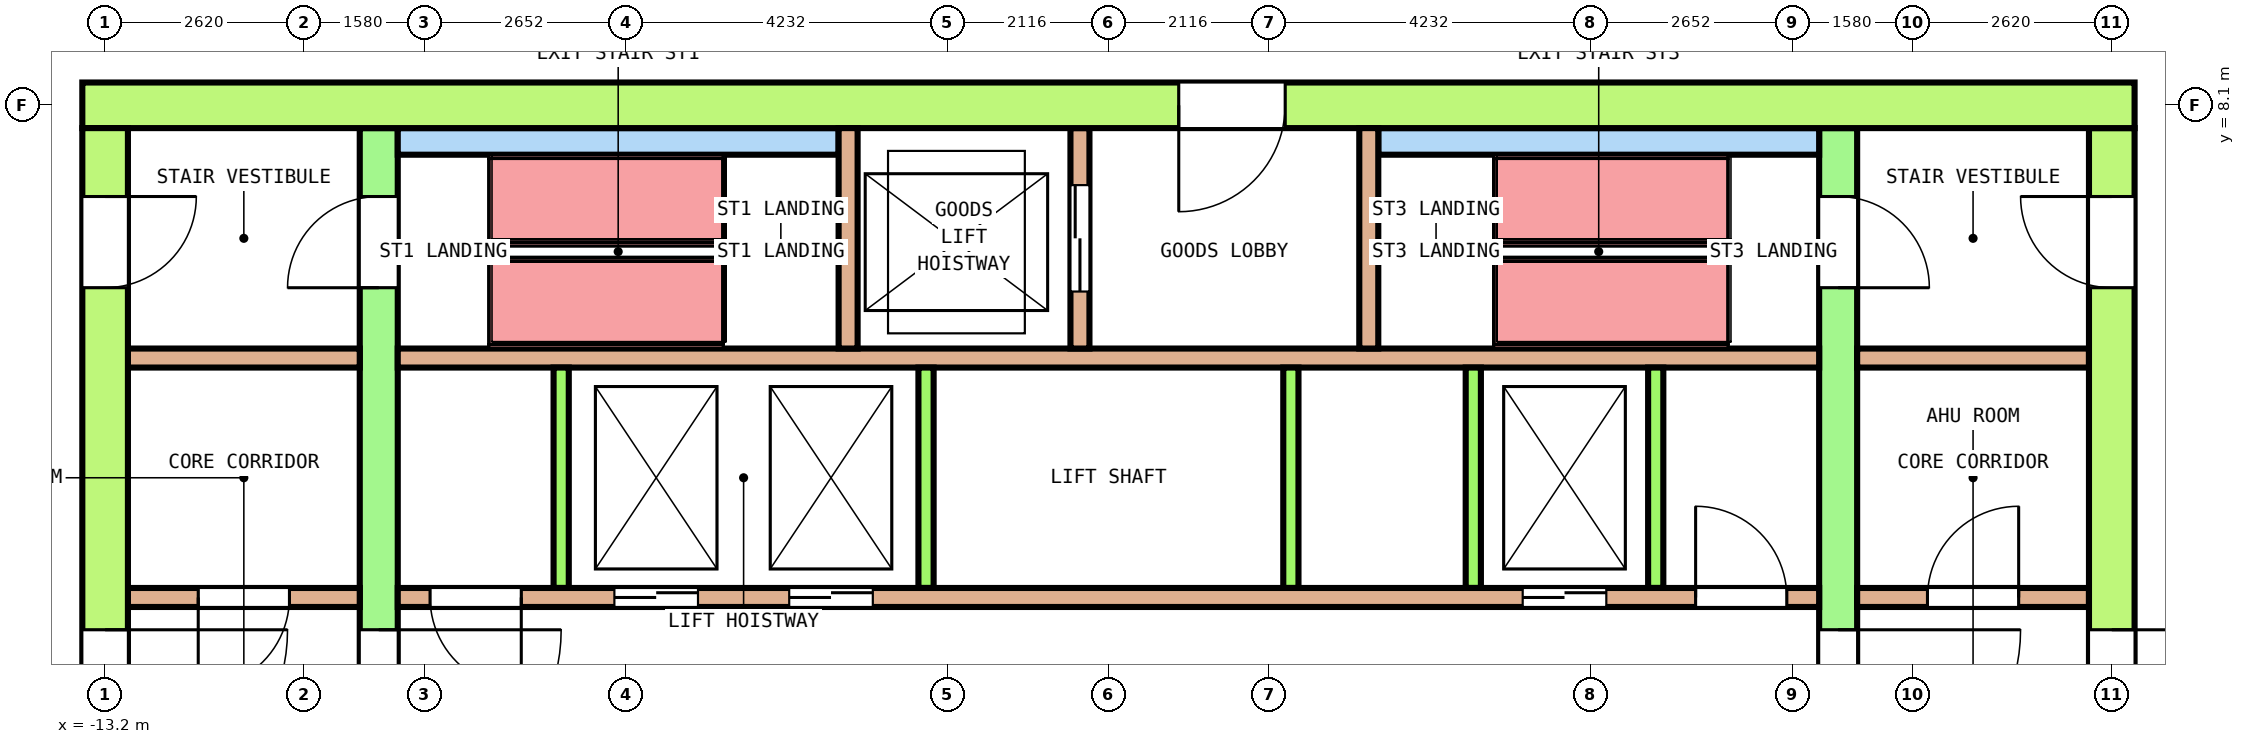
"""IFC4 building model, lengths in metres.
Left out: names, types, materials, properties, quantities, classifications, styles, units other than length and angle.
Written with IfcOpenShell. Run it as: python <this file> out.ifc"""

import sys

from ifc_helpers import new_model, si_unit, direction, frame, frame_2d, origin, place, context, subcontext, project, spatial, rectangle, extrude, element, fill, save


model = new_model("IFC4")
c1 = context("Model", 3, precision=1e-05, world=origin(), true_north=direction((0.0, 1.0)))
c2 = subcontext(c1, "Body", "Model", "MODEL_VIEW")
j1 = project(units=[si_unit("LENGTHUNIT", "METRE"), si_unit("PLANEANGLEUNIT", "RADIAN")], contexts=[c1])
p1 = place(None, origin())
s1 = spatial("IfcSite", under=j1, at=p1, CompositionType="ELEMENT")
p2 = place(p1, origin())
s2 = spatial("IfcBuilding", under=s1, at=p2, CompositionType="ELEMENT")
p3 = place(p2, frame((0.0, 0.0, 202.4)))
s3 = spatial("IfcBuildingStorey", under=s2, at=p3, CompositionType="ELEMENT", Elevation=202.4)
p4 = place(p3, frame((-13.5, 8.1, 0.0), z_axis=(0.0, 0.0, 1.0), x_axis=(1.0, 0.0, 0.0)))
e1 = element("IfcWall", 1, at=p4, inside=s3, PredefinedType="SHEAR", context=c2, shape_type="SweptSolid", body=[
    extrude(rectangle(XDim=27.0, YDim=0.6, at=frame_2d((13.5, 0.0))), origin(), (0.0, 0.0, 1.0), 8.7),
])
p5 = place(p4, frame((14.425, 0.0, 0.0)))
e2 = element("IfcOpeningElement", 2, at=p5, cuts=e1, PredefinedType="OPENING", context=c2, shape_type="SweptSolid", body=[
    extrude(rectangle(XDim=1.4, YDim=2.1, at=frame_2d((0.7, 1.05))), frame((0.0, 0.31, 0.0), z_axis=(0.0, -1.0, 0.0), x_axis=(1.0, 0.0, 0.0)), (0.0, 0.0, 1.0), 0.62),
])
p6 = place(p3, frame((-13.2, -7.8, 0.0), z_axis=(0.0, 0.0, 1.0), x_axis=(0.0, 1.0, 0.0)))
e3 = element("IfcWall", 3, at=p6, inside=s3, PredefinedType="SHEAR", context=c2, shape_type="SweptSolid", body=[
    extrude(rectangle(XDim=15.6, YDim=0.6, at=frame_2d((7.8, 0.0))), origin(), (0.0, 0.0, 1.0), 8.7),
])
p7 = place(p6, frame((6.6, 0.0, 0.0)))
e4 = element("IfcOpeningElement", 4, at=p7, cuts=e3, PredefinedType="OPENING", context=c2, shape_type="SweptSolid", body=[
    extrude(rectangle(XDim=2.4, YDim=2.1, at=frame_2d((1.2, 1.05))), frame((0.0, 0.31, 0.0), z_axis=(0.0, -1.0, 0.0), x_axis=(1.0, 0.0, 0.0)), (0.0, 0.0, 1.0), 0.62),
])
p8 = place(p6, frame((13.5, 0.0, 0.0)))
e5 = element("IfcOpeningElement", 5, at=p8, cuts=e3, PredefinedType="OPENING", context=c2, shape_type="SweptSolid", body=[
    extrude(rectangle(XDim=1.2, YDim=2.1, at=frame_2d((0.6, 1.05))), frame((0.0, 0.31, 0.0), z_axis=(0.0, -1.0, 0.0), x_axis=(1.0, 0.0, 0.0)), (0.0, 0.0, 1.0), 0.62),
])
p9 = place(p6, frame((0.9, 0.0, 0.0)))
e6 = element("IfcOpeningElement", 6, at=p9, cuts=e3, PredefinedType="OPENING", context=c2, shape_type="SweptSolid", body=[
    extrude(rectangle(XDim=1.2, YDim=2.1, at=frame_2d((0.6, 1.05))), frame((0.0, 0.31, 0.0), z_axis=(0.0, -1.0, 0.0), x_axis=(1.0, 0.0, 0.0)), (0.0, 0.0, 1.0), 0.62),
])
p10 = place(p3, frame((13.2, -7.8, 0.0), z_axis=(0.0, 0.0, 1.0), x_axis=(0.0, 1.0, 0.0)))
e7 = element("IfcWall", 7, at=p10, inside=s3, PredefinedType="SHEAR", context=c2, shape_type="SweptSolid", body=[
    extrude(rectangle(XDim=15.6, YDim=0.6, at=frame_2d((7.8, 0.0))), origin(), (0.0, 0.0, 1.0), 8.7),
])
p11 = place(p10, frame((6.6, 0.0, 0.0)))
e8 = element("IfcOpeningElement", 8, at=p11, cuts=e7, PredefinedType="OPENING", context=c2, shape_type="SweptSolid", body=[
    extrude(rectangle(XDim=2.4, YDim=2.1, at=frame_2d((1.2, 1.05))), frame((0.0, 0.31, 0.0), z_axis=(0.0, -1.0, 0.0), x_axis=(1.0, 0.0, 0.0)), (0.0, 0.0, 1.0), 0.62),
])
p12 = place(p10, frame((13.5, 0.0, 0.0)))
e9 = element("IfcOpeningElement", 9, at=p12, cuts=e7, PredefinedType="OPENING", context=c2, shape_type="SweptSolid", body=[
    extrude(rectangle(XDim=1.2, YDim=2.1, at=frame_2d((0.6, 1.05))), frame((0.0, 0.31, 0.0), z_axis=(0.0, -1.0, 0.0), x_axis=(1.0, 0.0, 0.0)), (0.0, 0.0, 1.0), 0.62),
])
p13 = place(p10, frame((1.0, 0.0, 0.0)))
e10 = element("IfcOpeningElement", 10, at=p13, cuts=e7, PredefinedType="OPENING", context=c2, shape_type="SweptSolid", body=[
    extrude(rectangle(XDim=1.0, YDim=2.1, at=frame_2d((0.5, 1.05))), frame((0.0, 0.31, 0.0), z_axis=(0.0, -1.0, 0.0), x_axis=(1.0, 0.0, 0.0)), (0.0, 0.0, 1.0), 0.62),
])
p14 = place(p3, frame((-9.6, -7.8, 0.0), z_axis=(0.0, 0.0, 1.0), x_axis=(0.0, 1.0, 0.0)))
e11 = element("IfcWall", 11, at=p14, inside=s3, PredefinedType="SHEAR", context=c2, shape_type="SweptSolid", body=[
    extrude(rectangle(XDim=15.6, YDim=0.5, at=frame_2d((7.8, 0.0))), origin(), (0.0, 0.0, 1.0), 8.7),
])
p15 = place(p14, frame((6.6, 0.0, 0.0)))
e12 = element("IfcOpeningElement", 12, at=p15, cuts=e11, PredefinedType="OPENING", context=c2, shape_type="SweptSolid", body=[
    extrude(rectangle(XDim=2.4, YDim=2.1, at=frame_2d((1.2, 1.05))), frame((0.0, 0.26, 0.0), z_axis=(0.0, -1.0, 0.0), x_axis=(1.0, 0.0, 0.0)), (0.0, 0.0, 1.0), 0.52),
])
p16 = place(p14, frame((13.5, 0.0, 0.0)))
e13 = element("IfcOpeningElement", 13, at=p16, cuts=e11, PredefinedType="OPENING", context=c2, shape_type="SweptSolid", body=[
    extrude(rectangle(XDim=1.2, YDim=2.1, at=frame_2d((0.6, 1.05))), frame((0.0, 0.26, 0.0), z_axis=(0.0, -1.0, 0.0), x_axis=(1.0, 0.0, 0.0)), (0.0, 0.0, 1.0), 0.52),
])
p17 = place(p14, frame((0.9, 0.0, 0.0)))
e14 = element("IfcOpeningElement", 14, at=p17, cuts=e11, PredefinedType="OPENING", context=c2, shape_type="SweptSolid", body=[
    extrude(rectangle(XDim=1.2, YDim=2.1, at=frame_2d((0.6, 1.05))), frame((0.0, 0.26, 0.0), z_axis=(0.0, -1.0, 0.0), x_axis=(1.0, 0.0, 0.0)), (0.0, 0.0, 1.0), 0.52),
])
p18 = place(p3, frame((9.6, -7.8, 0.0), z_axis=(0.0, 0.0, 1.0), x_axis=(0.0, 1.0, 0.0)))
e15 = element("IfcWall", 15, at=p18, inside=s3, PredefinedType="SHEAR", context=c2, shape_type="SweptSolid", body=[
    extrude(rectangle(XDim=15.6, YDim=0.5, at=frame_2d((7.8, 0.0))), origin(), (0.0, 0.0, 1.0), 8.7),
])
p19 = place(p18, frame((6.6, 0.0, 0.0)))
e16 = element("IfcOpeningElement", 16, at=p19, cuts=e15, PredefinedType="OPENING", context=c2, shape_type="SweptSolid", body=[
    extrude(rectangle(XDim=2.4, YDim=2.1, at=frame_2d((1.2, 1.05))), frame((0.0, 0.26, 0.0), z_axis=(0.0, -1.0, 0.0), x_axis=(1.0, 0.0, 0.0)), (0.0, 0.0, 1.0), 0.52),
])
p20 = place(p18, frame((13.5, 0.0, 0.0)))
e17 = element("IfcOpeningElement", 17, at=p20, cuts=e15, PredefinedType="OPENING", context=c2, shape_type="SweptSolid", body=[
    extrude(rectangle(XDim=1.2, YDim=2.1, at=frame_2d((0.6, 1.05))), frame((0.0, 0.26, 0.0), z_axis=(0.0, -1.0, 0.0), x_axis=(1.0, 0.0, 0.0)), (0.0, 0.0, 1.0), 0.52),
])
p21 = place(p18, frame((1.0, 0.0, 0.0)))
e18 = element("IfcOpeningElement", 18, at=p21, cuts=e15, PredefinedType="OPENING", context=c2, shape_type="SweptSolid", body=[
    extrude(rectangle(XDim=1.0, YDim=2.1, at=frame_2d((0.5, 1.05))), frame((0.0, 0.26, 0.0), z_axis=(0.0, -1.0, 0.0), x_axis=(1.0, 0.0, 0.0)), (0.0, 0.0, 1.0), 0.52),
])
p22 = place(p3, frame((-12.9, 1.625, 0.0), z_axis=(0.0, 0.0, 1.0), x_axis=(1.0, 0.0, 0.0)))
e19 = element("IfcWall", 19, at=p22, inside=s3, PredefinedType="SOLIDWALL", context=c2, shape_type="SweptSolid", body=[
    extrude(rectangle(XDim=3.05, YDim=0.25, at=frame_2d((1.525, 0.0))), origin(), (0.0, 0.0, 1.0), 8.7),
])
p23 = place(p22, frame((0.925, 0.0, 0.0)))
e20 = element("IfcOpeningElement", 20, at=p23, cuts=e19, PredefinedType="OPENING", context=c2, shape_type="SweptSolid", body=[
    extrude(rectangle(XDim=1.2, YDim=2.1, at=frame_2d((0.6, 1.05))), frame((0.0, 0.135, 0.0), z_axis=(0.0, -1.0, 0.0), x_axis=(1.0, 0.0, 0.0)), (0.0, 0.0, 1.0), 0.27),
])
p24 = place(p3, frame((-9.35, 1.625, 0.0), z_axis=(0.0, 0.0, 1.0), x_axis=(1.0, 0.0, 0.0)))
e21 = element("IfcWall", 21, at=p24, inside=s3, PredefinedType="SOLIDWALL", context=c2, shape_type="SweptSolid", body=[
    extrude(rectangle(XDim=18.7, YDim=0.25, at=frame_2d((9.35, 0.0))), origin(), (0.0, 0.0, 1.0), 8.7),
])
p25 = place(p24, frame((2.85, 0.0, 0.0)))
e22 = element("IfcOpeningElement", 22, at=p25, cuts=e21, PredefinedType="OPENING", context=c2, shape_type="SweptSolid", body=[
    extrude(rectangle(XDim=1.1, YDim=2.1, at=frame_2d((0.55, 1.05))), frame((0.0, 0.135, 0.0), z_axis=(0.0, -1.0, 0.0), x_axis=(1.0, 0.0, 0.0)), (0.0, 0.0, 1.0), 0.27),
])
p26 = place(p24, frame((5.15, 0.0, 0.0)))
e23 = element("IfcOpeningElement", 23, at=p26, cuts=e21, PredefinedType="OPENING", context=c2, shape_type="SweptSolid", body=[
    extrude(rectangle(XDim=1.1, YDim=2.1, at=frame_2d((0.55, 1.05))), frame((0.0, 0.135, 0.0), z_axis=(0.0, -1.0, 0.0), x_axis=(1.0, 0.0, 0.0)), (0.0, 0.0, 1.0), 0.27),
])
p27 = place(p24, frame((14.8, 0.0, 0.0)))
e24 = element("IfcOpeningElement", 24, at=p27, cuts=e21, PredefinedType="OPENING", context=c2, shape_type="SweptSolid", body=[
    extrude(rectangle(XDim=1.1, YDim=2.1, at=frame_2d((0.55, 1.05))), frame((0.0, 0.135, 0.0), z_axis=(0.0, -1.0, 0.0), x_axis=(1.0, 0.0, 0.0)), (0.0, 0.0, 1.0), 0.27),
])
p28 = place(p24, frame((0.425, 0.0, 0.0)))
e25 = element("IfcOpeningElement", 25, at=p28, cuts=e21, PredefinedType="OPENING", context=c2, shape_type="SweptSolid", body=[
    extrude(rectangle(XDim=1.2, YDim=2.1, at=frame_2d((0.6, 1.05))), frame((0.0, 0.135, 0.0), z_axis=(0.0, -1.0, 0.0), x_axis=(1.0, 0.0, 0.0)), (0.0, 0.0, 1.0), 0.27),
])
p29 = place(p24, frame((17.075, 0.0, 0.0)))
e26 = element("IfcOpeningElement", 26, at=p29, cuts=e21, PredefinedType="OPENING", context=c2, shape_type="SweptSolid", body=[
    extrude(rectangle(XDim=1.2, YDim=2.1, at=frame_2d((0.6, 1.05))), frame((0.0, 0.135, 0.0), z_axis=(0.0, -1.0, 0.0), x_axis=(1.0, 0.0, 0.0)), (0.0, 0.0, 1.0), 0.27),
])
p30 = place(p3, frame((9.85, 1.625, 0.0), z_axis=(0.0, 0.0, 1.0), x_axis=(1.0, 0.0, 0.0)))
e27 = element("IfcWall", 27, at=p30, inside=s3, PredefinedType="SOLIDWALL", context=c2, shape_type="SweptSolid", body=[
    extrude(rectangle(XDim=3.05, YDim=0.25, at=frame_2d((1.525, 0.0))), origin(), (0.0, 0.0, 1.0), 8.7),
])
p31 = place(p30, frame((0.925, 0.0, 0.0)))
e28 = element("IfcOpeningElement", 28, at=p31, cuts=e27, PredefinedType="OPENING", context=c2, shape_type="SweptSolid", body=[
    extrude(rectangle(XDim=1.2, YDim=2.1, at=frame_2d((0.6, 1.05))), frame((0.0, 0.135, 0.0), z_axis=(0.0, -1.0, 0.0), x_axis=(1.0, 0.0, 0.0)), (0.0, 0.0, 1.0), 0.27),
])
p32 = place(p3, frame((-12.9, 4.775, 0.0), z_axis=(0.0, 0.0, 1.0), x_axis=(1.0, 0.0, 0.0)))
e29 = element("IfcWall", 29, at=p32, inside=s3, PredefinedType="SOLIDWALL", context=c2, shape_type="SweptSolid", body=[
    extrude(rectangle(XDim=3.05, YDim=0.25, at=frame_2d((1.525, 0.0))), origin(), (0.0, 0.0, 1.0), 8.7),
])
p33 = place(p3, frame((-9.35, 4.775, 0.0), z_axis=(0.0, 0.0, 1.0), x_axis=(1.0, 0.0, 0.0)))
e30 = element("IfcWall", 30, at=p33, inside=s3, PredefinedType="SOLIDWALL", context=c2, shape_type="SweptSolid", body=[
    extrude(rectangle(XDim=18.7, YDim=0.25, at=frame_2d((9.35, 0.0))), origin(), (0.0, 0.0, 1.0), 8.7),
])
p34 = place(p3, frame((9.85, 4.775, 0.0), z_axis=(0.0, 0.0, 1.0), x_axis=(1.0, 0.0, 0.0)))
e31 = element("IfcWall", 31, at=p34, inside=s3, PredefinedType="SOLIDWALL", context=c2, shape_type="SweptSolid", body=[
    extrude(rectangle(XDim=3.05, YDim=0.25, at=frame_2d((1.525, 0.0))), origin(), (0.0, 0.0, 1.0), 8.7),
])
for number, where, z_axis, x_axis in (
    (32, (-7.2, 1.75, 0.0), (0.0, 0.0, 1.0), (0.0, 1.0, 0.0)),
    (33, (-2.4, 1.75, 0.0), (0.0, 0.0, 1.0), (0.0, 1.0, 0.0)),
    (34, (2.4, 1.75, 0.0), (0.0, 0.0, 1.0), (0.0, 1.0, 0.0)),
    (35, (4.8, 1.75, 0.0), (0.0, 0.0, 1.0), (0.0, 1.0, 0.0)),
    (36, (7.2, 1.75, 0.0), (0.0, 0.0, 1.0), (0.0, 1.0, 0.0)),
):
    element("IfcWall", number, at=place(p3, frame(where, z_axis=z_axis, x_axis=x_axis)), inside=s3, PredefinedType="SOLIDWALL", context=c2, shape_type="SweptSolid", body=[
        extrude(rectangle(XDim=2.9, YDim=0.2, at=frame_2d((1.45, 0.0))), origin(), (0.0, 0.0, 1.0), 8.7),
    ])
for number, where, z_axis, x_axis in (
    (37, (-9.35, 7.625, 0.0), (0.0, 0.0, 1.0), (1.0, 0.0, 0.0)),
    (38, (3.55, 7.625, 0.0), (0.0, 0.0, 1.0), (1.0, 0.0, 0.0)),
):
    element("IfcWall", number, at=place(p3, frame(where, z_axis=z_axis, x_axis=x_axis)), inside=s3, PredefinedType="SOLIDWALL", context=c2, shape_type="SweptSolid", body=[
        extrude(rectangle(XDim=5.8, YDim=0.35, at=frame_2d((2.9, 0.0))), origin(), (0.0, 0.0, 1.0), 8.7),
    ])
p35 = place(p3, frame((-3.425, 4.9, 0.0), z_axis=(0.0, 0.0, 1.0), x_axis=(0.0, 1.0, 0.0)))
e39 = element("IfcWall", 39, at=p35, inside=s3, PredefinedType="SOLIDWALL", context=c2, shape_type="SweptSolid", body=[
    extrude(rectangle(XDim=2.9, YDim=0.25, at=frame_2d((1.45, 0.0))), origin(), (0.0, 0.0, 1.0), 8.7),
])
p36 = place(p3, frame((-0.375, 4.9, 0.0), z_axis=(0.0, 0.0, 1.0), x_axis=(0.0, 1.0, 0.0)))
e40 = element("IfcWall", 40, at=p36, inside=s3, PredefinedType="SOLIDWALL", context=c2, shape_type="SweptSolid", body=[
    extrude(rectangle(XDim=2.9, YDim=0.25, at=frame_2d((1.45, 0.0))), origin(), (0.0, 0.0, 1.0), 8.7),
])
p37 = place(p36, frame((0.75, 0.0, 0.0)))
e41 = element("IfcOpeningElement", 41, at=p37, cuts=e40, PredefinedType="OPENING", context=c2, shape_type="SweptSolid", body=[
    extrude(rectangle(XDim=1.4, YDim=2.1, at=frame_2d((0.7, 1.05))), frame((0.0, 0.135, 0.0), z_axis=(0.0, -1.0, 0.0), x_axis=(1.0, 0.0, 0.0)), (0.0, 0.0, 1.0), 0.27),
])
p38 = place(p3, frame((3.425, 4.9, 0.0), z_axis=(0.0, 0.0, 1.0), x_axis=(0.0, 1.0, 0.0)))
e42 = element("IfcWall", 42, at=p38, inside=s3, PredefinedType="SOLIDWALL", context=c2, shape_type="SweptSolid", body=[
    extrude(rectangle(XDim=2.9, YDim=0.25, at=frame_2d((1.45, 0.0))), origin(), (0.0, 0.0, 1.0), 8.7),
])
p39 = place(p25, origin())
e43 = element("IfcDoor", 43, at=p39, inside=s3, OperationType="DOUBLE_DOOR_SLIDING", PredefinedType="DOOR", context=c2, shape_type="SweptSolid", body=[
    extrude(rectangle(XDim=1.1, YDim=2.1, at=frame_2d((0.55, 1.05))), frame((0.0, 0.075, 0.0), z_axis=(0.0, -1.0, 0.0), x_axis=(1.0, 0.0, 0.0)), (0.0, 0.0, 1.0), 0.15),
])
fill(e22, e43)
p40 = place(p26, origin())
e44 = element("IfcDoor", 44, at=p40, inside=s3, OperationType="DOUBLE_DOOR_SLIDING", PredefinedType="DOOR", context=c2, shape_type="SweptSolid", body=[
    extrude(rectangle(XDim=1.1, YDim=2.1, at=frame_2d((0.55, 1.05))), frame((0.0, 0.075, 0.0), z_axis=(0.0, -1.0, 0.0), x_axis=(1.0, 0.0, 0.0)), (0.0, 0.0, 1.0), 0.15),
])
fill(e23, e44)
p41 = place(p27, origin())
e45 = element("IfcDoor", 45, at=p41, inside=s3, OperationType="DOUBLE_DOOR_SLIDING", PredefinedType="DOOR", context=c2, shape_type="SweptSolid", body=[
    extrude(rectangle(XDim=1.1, YDim=2.1, at=frame_2d((0.55, 1.05))), frame((0.0, 0.075, 0.0), z_axis=(0.0, -1.0, 0.0), x_axis=(1.0, 0.0, 0.0)), (0.0, 0.0, 1.0), 0.15),
])
fill(e24, e45)
p42 = place(p37, origin())
e46 = element("IfcDoor", 46, at=p42, inside=s3, OperationType="DOUBLE_DOOR_SLIDING", PredefinedType="DOOR", context=c2, shape_type="SweptSolid", body=[
    extrude(rectangle(XDim=1.4, YDim=2.1, at=frame_2d((0.7, 1.05))), frame((0.0, 0.075, 0.0), z_axis=(0.0, -1.0, 0.0), x_axis=(1.0, 0.0, 0.0)), (0.0, 0.0, 1.0), 0.15),
])
fill(e41, e46)
p43 = place(p15, origin())
e47 = element("IfcDoor", 47, at=p43, inside=s3, OperationType="DOUBLE_DOOR_SINGLE_SWING", PredefinedType="DOOR", context=c2, shape_type="SweptSolid", body=[
    extrude(rectangle(XDim=2.4, YDim=2.1, at=frame_2d((1.2, 1.05))), frame((0.0, 0.2, 0.0), z_axis=(0.0, -1.0, 0.0), x_axis=(1.0, 0.0, 0.0)), (0.0, 0.0, 1.0), 0.4),
])
fill(e12, e47)
p44 = place(p19, origin())
e48 = element("IfcDoor", 48, at=p44, inside=s3, OperationType="DOUBLE_DOOR_SINGLE_SWING", PredefinedType="DOOR", context=c2, shape_type="SweptSolid", body=[
    extrude(rectangle(XDim=2.4, YDim=2.1, at=frame_2d((1.2, 1.05))), frame((0.0, 0.2, 0.0), z_axis=(0.0, -1.0, 0.0), x_axis=(1.0, 0.0, 0.0)), (0.0, 0.0, 1.0), 0.4),
])
fill(e16, e48)
p45 = place(p7, origin())
e49 = element("IfcDoor", 49, at=p45, inside=s3, OperationType="DOUBLE_DOOR_SINGLE_SWING", PredefinedType="DOOR", context=c2, shape_type="SweptSolid", body=[
    extrude(rectangle(XDim=2.4, YDim=2.1, at=frame_2d((1.2, 1.05))), frame((0.0, 0.25, 0.0), z_axis=(0.0, -1.0, 0.0), x_axis=(1.0, 0.0, 0.0)), (0.0, 0.0, 1.0), 0.5),
])
fill(e4, e49)
p46 = place(p11, origin())
e50 = element("IfcDoor", 50, at=p46, inside=s3, OperationType="DOUBLE_DOOR_SINGLE_SWING", PredefinedType="DOOR", context=c2, shape_type="SweptSolid", body=[
    extrude(rectangle(XDim=2.4, YDim=2.1, at=frame_2d((1.2, 1.05))), frame((0.0, 0.25, 0.0), z_axis=(0.0, -1.0, 0.0), x_axis=(1.0, 0.0, 0.0)), (0.0, 0.0, 1.0), 0.5),
])
fill(e8, e50)
p47 = place(p16, origin())
e51 = element("IfcDoor", 51, at=p47, inside=s3, OperationType="SINGLE_SWING_RIGHT", PredefinedType="DOOR", context=c2, shape_type="SweptSolid", body=[
    extrude(rectangle(XDim=1.2, YDim=2.1, at=frame_2d((0.6, 1.05))), frame((0.0, 0.2, 0.0), z_axis=(0.0, -1.0, 0.0), x_axis=(1.0, 0.0, 0.0)), (0.0, 0.0, 1.0), 0.4),
])
fill(e13, e51)
p48 = place(p8, origin())
e52 = element("IfcDoor", 52, at=p48, inside=s3, OperationType="SINGLE_SWING_LEFT", PredefinedType="DOOR", context=c2, shape_type="SweptSolid", body=[
    extrude(rectangle(XDim=1.2, YDim=2.1, at=frame_2d((0.6, 1.05))), frame((0.0, 0.25, 0.0), z_axis=(0.0, -1.0, 0.0), x_axis=(1.0, 0.0, 0.0)), (0.0, 0.0, 1.0), 0.5),
])
fill(e5, e52)
p49 = place(p20, origin())
e53 = element("IfcDoor", 53, at=p49, inside=s3, OperationType="SINGLE_SWING_RIGHT", PredefinedType="DOOR", context=c2, shape_type="SweptSolid", body=[
    extrude(rectangle(XDim=1.2, YDim=2.1, at=frame_2d((0.6, 1.05))), frame((0.0, 0.2, 0.0), z_axis=(0.0, -1.0, 0.0), x_axis=(1.0, 0.0, 0.0)), (0.0, 0.0, 1.0), 0.4),
])
fill(e17, e53)
p50 = place(p12, origin())
e54 = element("IfcDoor", 54, at=p50, inside=s3, OperationType="SINGLE_SWING_LEFT", PredefinedType="DOOR", context=c2, shape_type="SweptSolid", body=[
    extrude(rectangle(XDim=1.2, YDim=2.1, at=frame_2d((0.6, 1.05))), frame((0.0, 0.25, 0.0), z_axis=(0.0, -1.0, 0.0), x_axis=(1.0, 0.0, 0.0)), (0.0, 0.0, 1.0), 0.5),
])
fill(e9, e54)
p51 = place(p5, origin())
e55 = element("IfcDoor", 55, at=p51, inside=s3, OperationType="DOUBLE_DOOR_SINGLE_SWING", PredefinedType="DOOR", context=c2, shape_type="SweptSolid", body=[
    extrude(rectangle(XDim=1.4, YDim=2.1, at=frame_2d((0.7, 1.05))), frame((0.0, 0.25, 0.0), z_axis=(0.0, -1.0, 0.0), x_axis=(1.0, 0.0, 0.0)), (0.0, 0.0, 1.0), 0.5),
])
fill(e2, e55)
p52 = place(p23, origin())
e56 = element("IfcDoor", 56, at=p52, inside=s3, OperationType="SINGLE_SWING_RIGHT", PredefinedType="DOOR", context=c2, shape_type="SweptSolid", body=[
    extrude(rectangle(XDim=1.2, YDim=2.1, at=frame_2d((0.6, 1.05))), frame((0.0, 0.075, 0.0), z_axis=(0.0, -1.0, 0.0), x_axis=(1.0, 0.0, 0.0)), (0.0, 0.0, 1.0), 0.15),
])
fill(e20, e56)
p53 = place(p28, origin())
e57 = element("IfcDoor", 57, at=p53, inside=s3, OperationType="SINGLE_SWING_LEFT", PredefinedType="DOOR", context=c2, shape_type="SweptSolid", body=[
    extrude(rectangle(XDim=1.2, YDim=2.1, at=frame_2d((0.6, 1.05))), frame((0.0, 0.075, 0.0), z_axis=(0.0, -1.0, 0.0), x_axis=(1.0, 0.0, 0.0)), (0.0, 0.0, 1.0), 0.15),
])
fill(e25, e57)
p54 = place(p29, origin())
e58 = element("IfcDoor", 58, at=p54, inside=s3, OperationType="SINGLE_SWING_RIGHT", PredefinedType="DOOR", context=c2, shape_type="SweptSolid", body=[
    extrude(rectangle(XDim=1.2, YDim=2.1, at=frame_2d((0.6, 1.05))), frame((0.0, 0.075, 0.0), z_axis=(0.0, -1.0, 0.0), x_axis=(1.0, 0.0, 0.0)), (0.0, 0.0, 1.0), 0.15),
])
fill(e26, e58)
p55 = place(p31, origin())
e59 = element("IfcDoor", 59, at=p55, inside=s3, OperationType="SINGLE_SWING_LEFT", PredefinedType="DOOR", context=c2, shape_type="SweptSolid", body=[
    extrude(rectangle(XDim=1.2, YDim=2.1, at=frame_2d((0.6, 1.05))), frame((0.0, 0.075, 0.0), z_axis=(0.0, -1.0, 0.0), x_axis=(1.0, 0.0, 0.0)), (0.0, 0.0, 1.0), 0.15),
])
fill(e28, e59)
save(model, sys.argv[1])
